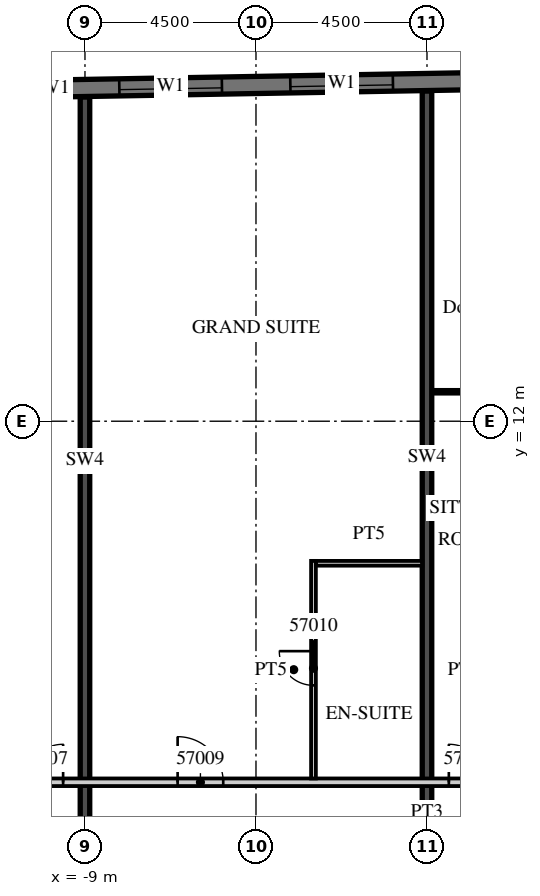
"""IFC4 building model, lengths in metres.
Left out: names, types, materials, properties, quantities, classifications, styles, units other than length and angle.
Written with IfcOpenShell. Run it as: python <this file> out.ifc"""

import sys

from ifc_helpers import new_model, si_unit, direction, frame, frame_2d, origin, place, context, subcontext, project, spatial, rectangle, extrude, element, fill, save


model = new_model("IFC4")
c1 = context("Model", 3, precision=1e-05, world=origin(), true_north=direction((0.0, 1.0)))
c2 = subcontext(c1, "Body", "Model", "MODEL_VIEW")
j1 = project(units=[si_unit("LENGTHUNIT", "METRE"), si_unit("PLANEANGLEUNIT", "RADIAN")], contexts=[c1])
p1 = place(None, origin())
s1 = spatial("IfcSite", under=j1, at=p1, CompositionType="ELEMENT")
p2 = place(p1, origin())
s2 = spatial("IfcBuilding", under=s1, at=p2, CompositionType="ELEMENT")
p3 = place(p2, frame((0.0, 0.0, 234.2)))
s3 = spatial("IfcBuildingStorey", under=s2, at=p3, CompositionType="ELEMENT", Elevation=234.2)
p4 = place(p3, frame((-9.0, 1.4, 0.0), z_axis=(0.0, 0.0, 1.0), x_axis=(0.0, 1.0, 0.0)))
e1 = element("IfcWall", 1, at=p4, inside=s3, PredefinedType="SHEAR", context=c2, shape_type="SweptSolid", body=[
    extrude(rectangle(XDim=19.132, YDim=0.25, at=frame_2d((9.566, 0.0))), origin(), (0.0, 0.0, 1.0), 3.3),
])
p5 = place(p3, frame((0.0, 1.4, 0.0), z_axis=(0.0, 0.0, 1.0), x_axis=(0.0, 1.0, 0.0)))
e2 = element("IfcWall", 2, at=p5, inside=s3, PredefinedType="SHEAR", context=c2, shape_type="SweptSolid", body=[
    extrude(rectangle(XDim=19.289, YDim=0.25, at=frame_2d((9.644, 0.0))), origin(), (0.0, 0.0, 1.0), 3.3),
])
p6 = place(p3, frame((13.504, 21.161, 0.0), z_axis=(0.0, 0.0, 1.0), x_axis=(-0.999847763257, -0.017448504532, 0.0)))
e3 = element("IfcWall", 3, at=p6, inside=s3, PredefinedType="SOLIDWALL", context=c2, shape_type="SweptSolid", body=[
    extrude(rectangle(XDim=46.859, YDim=0.45, at=frame_2d((23.43, 0.0))), origin(), (0.0, 0.0, 1.0), 3.02),
])
p7 = place(p6, frame((0.9, 0.0, 0.45)))
e4 = element("IfcOpeningElement", 4, at=p7, cuts=e3, PredefinedType="OPENING", context=c2, shape_type="SweptSolid", body=[
    extrude(rectangle(XDim=2.7, YDim=2.25, at=frame_2d((1.35, 1.125))), frame((0.0, 0.235, 0.0), z_axis=(0.0, -1.0, 0.0), x_axis=(1.0, 0.0, 0.0)), (0.0, 0.0, 1.0), 0.47),
])
p8 = place(p6, frame((5.401, 0.0, 0.45)))
e5 = element("IfcOpeningElement", 5, at=p8, cuts=e3, PredefinedType="OPENING", context=c2, shape_type="SweptSolid", body=[
    extrude(rectangle(XDim=2.7, YDim=2.25, at=frame_2d((1.35, 1.125))), frame((0.0, 0.235, 0.0), z_axis=(0.0, -1.0, 0.0), x_axis=(1.0, 0.0, 0.0)), (0.0, 0.0, 1.0), 0.47),
])
p9 = place(p6, frame((9.902, 0.0, 0.45)))
e6 = element("IfcOpeningElement", 6, at=p9, cuts=e3, PredefinedType="OPENING", context=c2, shape_type="SweptSolid", body=[
    extrude(rectangle(XDim=2.7, YDim=2.25, at=frame_2d((1.35, 1.125))), frame((0.0, 0.235, 0.0), z_axis=(0.0, -1.0, 0.0), x_axis=(1.0, 0.0, 0.0)), (0.0, 0.0, 1.0), 0.47),
])
p10 = place(p6, frame((14.402, 0.0, 0.45)))
e7 = element("IfcOpeningElement", 7, at=p10, cuts=e3, PredefinedType="OPENING", context=c2, shape_type="SweptSolid", body=[
    extrude(rectangle(XDim=2.7, YDim=2.25, at=frame_2d((1.35, 1.125))), frame((0.0, 0.235, 0.0), z_axis=(0.0, -1.0, 0.0), x_axis=(1.0, 0.0, 0.0)), (0.0, 0.0, 1.0), 0.47),
])
p11 = place(p6, frame((18.903, 0.0, 0.45)))
e8 = element("IfcOpeningElement", 8, at=p11, cuts=e3, PredefinedType="OPENING", context=c2, shape_type="SweptSolid", body=[
    extrude(rectangle(XDim=2.7, YDim=2.25, at=frame_2d((1.35, 1.125))), frame((0.0, 0.235, 0.0), z_axis=(0.0, -1.0, 0.0), x_axis=(1.0, 0.0, 0.0)), (0.0, 0.0, 1.0), 0.47),
])
p12 = place(p6, frame((23.404, 0.0, 0.45)))
e9 = element("IfcOpeningElement", 9, at=p12, cuts=e3, PredefinedType="OPENING", context=c2, shape_type="SweptSolid", body=[
    extrude(rectangle(XDim=2.7, YDim=2.25, at=frame_2d((1.35, 1.125))), frame((0.0, 0.235, 0.0), z_axis=(0.0, -1.0, 0.0), x_axis=(1.0, 0.0, 0.0)), (0.0, 0.0, 1.0), 0.47),
])
p13 = place(p6, frame((27.904, 0.0, 0.45)))
e10 = element("IfcOpeningElement", 10, at=p13, cuts=e3, PredefinedType="OPENING", context=c2, shape_type="SweptSolid", body=[
    extrude(rectangle(XDim=2.7, YDim=2.25, at=frame_2d((1.35, 1.125))), frame((0.0, 0.235, 0.0), z_axis=(0.0, -1.0, 0.0), x_axis=(1.0, 0.0, 0.0)), (0.0, 0.0, 1.0), 0.47),
])
p14 = place(p6, frame((32.405, 0.0, 0.45)))
e11 = element("IfcOpeningElement", 11, at=p14, cuts=e3, PredefinedType="OPENING", context=c2, shape_type="SweptSolid", body=[
    extrude(rectangle(XDim=2.7, YDim=2.25, at=frame_2d((1.35, 1.125))), frame((0.0, 0.235, 0.0), z_axis=(0.0, -1.0, 0.0), x_axis=(1.0, 0.0, 0.0)), (0.0, 0.0, 1.0), 0.47),
])
p15 = place(p6, frame((36.906, 0.0, 0.45)))
e12 = element("IfcOpeningElement", 12, at=p15, cuts=e3, PredefinedType="OPENING", context=c2, shape_type="SweptSolid", body=[
    extrude(rectangle(XDim=2.7, YDim=2.25, at=frame_2d((1.35, 1.125))), frame((0.0, 0.235, 0.0), z_axis=(0.0, -1.0, 0.0), x_axis=(1.0, 0.0, 0.0)), (0.0, 0.0, 1.0), 0.47),
])
p16 = place(p6, frame((41.406, 0.0, 0.45)))
e13 = element("IfcOpeningElement", 13, at=p16, cuts=e3, PredefinedType="OPENING", context=c2, shape_type="SweptSolid", body=[
    extrude(rectangle(XDim=2.7, YDim=2.25, at=frame_2d((1.35, 1.125))), frame((0.0, 0.235, 0.0), z_axis=(0.0, -1.0, 0.0), x_axis=(1.0, 0.0, 0.0)), (0.0, 0.0, 1.0), 0.47),
])
p17 = place(p3, frame((-13.5, 2.5, 0.0), z_axis=(0.0, 0.0, 1.0), x_axis=(1.0, 0.0, 0.0)))
e14 = element("IfcWall", 14, at=p17, inside=s3, PredefinedType="PARTITIONING", context=c2, shape_type="SweptSolid", body=[
    extrude(rectangle(XDim=27.0, YDim=0.2, at=frame_2d((13.5, 0.0))), origin(), (0.0, 0.0, 1.0), 3.02),
])
p18 = place(p17, frame((2.925, 0.0, 0.0)))
e15 = element("IfcOpeningElement", 15, at=p18, cuts=e14, PredefinedType="OPENING", context=c2, shape_type="SweptSolid", body=[
    extrude(rectangle(XDim=1.0, YDim=2.1, at=frame_2d((0.5, 1.05))), frame((0.0, 0.11, 0.0), z_axis=(0.0, -1.0, 0.0), x_axis=(1.0, 0.0, 0.0)), (0.0, 0.0, 1.0), 0.22),
])
p19 = place(p17, frame((6.938, 0.0, 0.0)))
e16 = element("IfcOpeningElement", 16, at=p19, cuts=e14, PredefinedType="OPENING", context=c2, shape_type="SweptSolid", body=[
    extrude(rectangle(XDim=1.2, YDim=2.1, at=frame_2d((0.6, 1.05))), frame((0.0, 0.11, 0.0), z_axis=(0.0, -1.0, 0.0), x_axis=(1.0, 0.0, 0.0)), (0.0, 0.0, 1.0), 0.22),
])
p20 = place(p17, frame((14.075, 0.0, 0.0)))
e17 = element("IfcOpeningElement", 17, at=p20, cuts=e14, PredefinedType="OPENING", context=c2, shape_type="SweptSolid", body=[
    extrude(rectangle(XDim=1.0, YDim=2.1, at=frame_2d((0.5, 1.05))), frame((0.0, 0.11, 0.0), z_axis=(0.0, -1.0, 0.0), x_axis=(1.0, 0.0, 0.0)), (0.0, 0.0, 1.0), 0.22),
])
p21 = place(p17, frame((20.925, 0.0, 0.0)))
e18 = element("IfcOpeningElement", 18, at=p21, cuts=e14, PredefinedType="OPENING", context=c2, shape_type="SweptSolid", body=[
    extrude(rectangle(XDim=1.0, YDim=2.1, at=frame_2d((0.5, 1.05))), frame((0.0, 0.11, 0.0), z_axis=(0.0, -1.0, 0.0), x_axis=(1.0, 0.0, 0.0)), (0.0, 0.0, 1.0), 0.22),
])
p22 = place(p17, frame((25.425, 0.0, 0.0)))
e19 = element("IfcOpeningElement", 19, at=p22, cuts=e14, PredefinedType="OPENING", context=c2, shape_type="SweptSolid", body=[
    extrude(rectangle(XDim=1.0, YDim=2.1, at=frame_2d((0.5, 1.05))), frame((0.0, 0.11, 0.0), z_axis=(0.0, -1.0, 0.0), x_axis=(1.0, 0.0, 0.0)), (0.0, 0.0, 1.0), 0.22),
])
p23 = place(p3, frame((-2.987, 2.6, 0.0), z_axis=(0.0, 0.0, 1.0), x_axis=(0.0, 1.0, 0.0)))
e20 = element("IfcWall", 20, at=p23, inside=s3, PredefinedType="PARTITIONING", context=c2, shape_type="SweptSolid", body=[
    extrude(rectangle(XDim=5.725, YDim=0.125, at=frame_2d((2.862, 0.0))), origin(), (0.0, 0.0, 1.0), 3.02),
])
p24 = place(p23, frame((2.45, 0.0, 0.0)))
e21 = element("IfcOpeningElement", 21, at=p24, cuts=e20, PredefinedType="OPENING", context=c2, shape_type="SweptSolid", body=[
    extrude(rectangle(XDim=0.9, YDim=2.1, at=frame_2d((0.45, 1.05))), frame((0.0, 0.073, 0.0), z_axis=(0.0, -1.0, 0.0), x_axis=(1.0, 0.0, 0.0)), (0.0, 0.0, 1.0), 0.145),
])
p25 = place(p3, frame((-2.925, 8.262, 0.0), z_axis=(0.0, 0.0, 1.0), x_axis=(1.0, 0.0, 0.0)))
e22 = element("IfcWall", 22, at=p25, inside=s3, PredefinedType="PARTITIONING", context=c2, shape_type="SweptSolid", body=[
    extrude(rectangle(XDim=2.8, YDim=0.125, at=frame_2d((1.4, 0.0))), origin(), (0.0, 0.0, 1.0), 3.02),
])
p26 = place(p3, frame((0.125, 12.775, 0.0), z_axis=(0.0, 0.0, 1.0), x_axis=(1.0, 0.0, 0.0)))
e23 = element("IfcWall", 23, at=p26, inside=s3, PredefinedType="PARTITIONING", context=c2, shape_type="SweptSolid", body=[
    extrude(rectangle(XDim=4.275, YDim=0.1, at=frame_2d((2.137, 0.0))), origin(), (0.0, 0.0, 1.0), 3.02),
])
p27 = place(p26, frame((1.388, 0.0, 0.0)))
e24 = element("IfcOpeningElement", 24, at=p27, cuts=e23, PredefinedType="OPENING", context=c2, shape_type="SweptSolid", body=[
    extrude(rectangle(XDim=1.5, YDim=2.1, at=frame_2d((0.75, 1.05))), frame((0.0, 0.06, 0.0), z_axis=(0.0, -1.0, 0.0), x_axis=(1.0, 0.0, 0.0)), (0.0, 0.0, 1.0), 0.12),
])
p28 = place(p10, origin())
e25 = element("IfcWindow", 25, at=p28, inside=s3, PartitioningType="SINGLE_PANEL", PredefinedType="WINDOW", context=c2, shape_type="SweptSolid", body=[
    extrude(rectangle(XDim=2.7, YDim=2.25, at=frame_2d((1.35, 1.125))), frame((0.0, 0.09, 0.0), z_axis=(0.0, -1.0, 0.0), x_axis=(1.0, 0.0, 0.0)), (0.0, 0.0, 1.0), 0.06),
])
fill(e7, e25)
p29 = place(p11, origin())
e26 = element("IfcWindow", 26, at=p29, inside=s3, PartitioningType="SINGLE_PANEL", PredefinedType="WINDOW", context=c2, shape_type="SweptSolid", body=[
    extrude(rectangle(XDim=2.7, YDim=2.25, at=frame_2d((1.35, 1.125))), frame((0.0, 0.09, 0.0), z_axis=(0.0, -1.0, 0.0), x_axis=(1.0, 0.0, 0.0)), (0.0, 0.0, 1.0), 0.06),
])
fill(e8, e26)
p30 = place(p18, origin())
e27 = element("IfcDoor", 27, at=p30, inside=s3, OperationType="SINGLE_SWING_RIGHT", PredefinedType="DOOR", context=c2, shape_type="SweptSolid", body=[
    extrude(rectangle(XDim=1.0, YDim=2.1, at=frame_2d((0.5, 1.05))), frame((0.0, 0.025, 0.0), z_axis=(0.0, -1.0, 0.0), x_axis=(1.0, 0.0, 0.0)), (0.0, 0.0, 1.0), 0.05),
])
fill(e15, e27)
p31 = place(p19, origin())
e28 = element("IfcDoor", 28, at=p31, inside=s3, OperationType="SINGLE_SWING_LEFT", PredefinedType="DOOR", context=c2, shape_type="SweptSolid", body=[
    extrude(rectangle(XDim=1.2, YDim=2.1, at=frame_2d((0.6, 1.05))), frame((0.0, 0.025, 0.0), z_axis=(0.0, -1.0, 0.0), x_axis=(1.0, 0.0, 0.0)), (0.0, 0.0, 1.0), 0.05),
])
fill(e16, e28)
p32 = place(p24, origin())
e29 = element("IfcDoor", 29, at=p32, inside=s3, OperationType="SINGLE_SWING_RIGHT", PredefinedType="DOOR", context=c2, shape_type="SweptSolid", body=[
    extrude(rectangle(XDim=0.9, YDim=2.1, at=frame_2d((0.45, 1.05))), frame((0.0, 0.025, 0.0), z_axis=(0.0, -1.0, 0.0), x_axis=(1.0, 0.0, 0.0)), (0.0, 0.0, 1.0), 0.05),
])
fill(e21, e29)
p33 = place(p20, origin())
e30 = element("IfcDoor", 30, at=p33, inside=s3, OperationType="SINGLE_SWING_LEFT", PredefinedType="DOOR", context=c2, shape_type="SweptSolid", body=[
    extrude(rectangle(XDim=1.0, YDim=2.1, at=frame_2d((0.5, 1.05))), frame((0.0, 0.025, 0.0), z_axis=(0.0, -1.0, 0.0), x_axis=(1.0, 0.0, 0.0)), (0.0, 0.0, 1.0), 0.05),
])
fill(e17, e30)
save(model, sys.argv[1])
